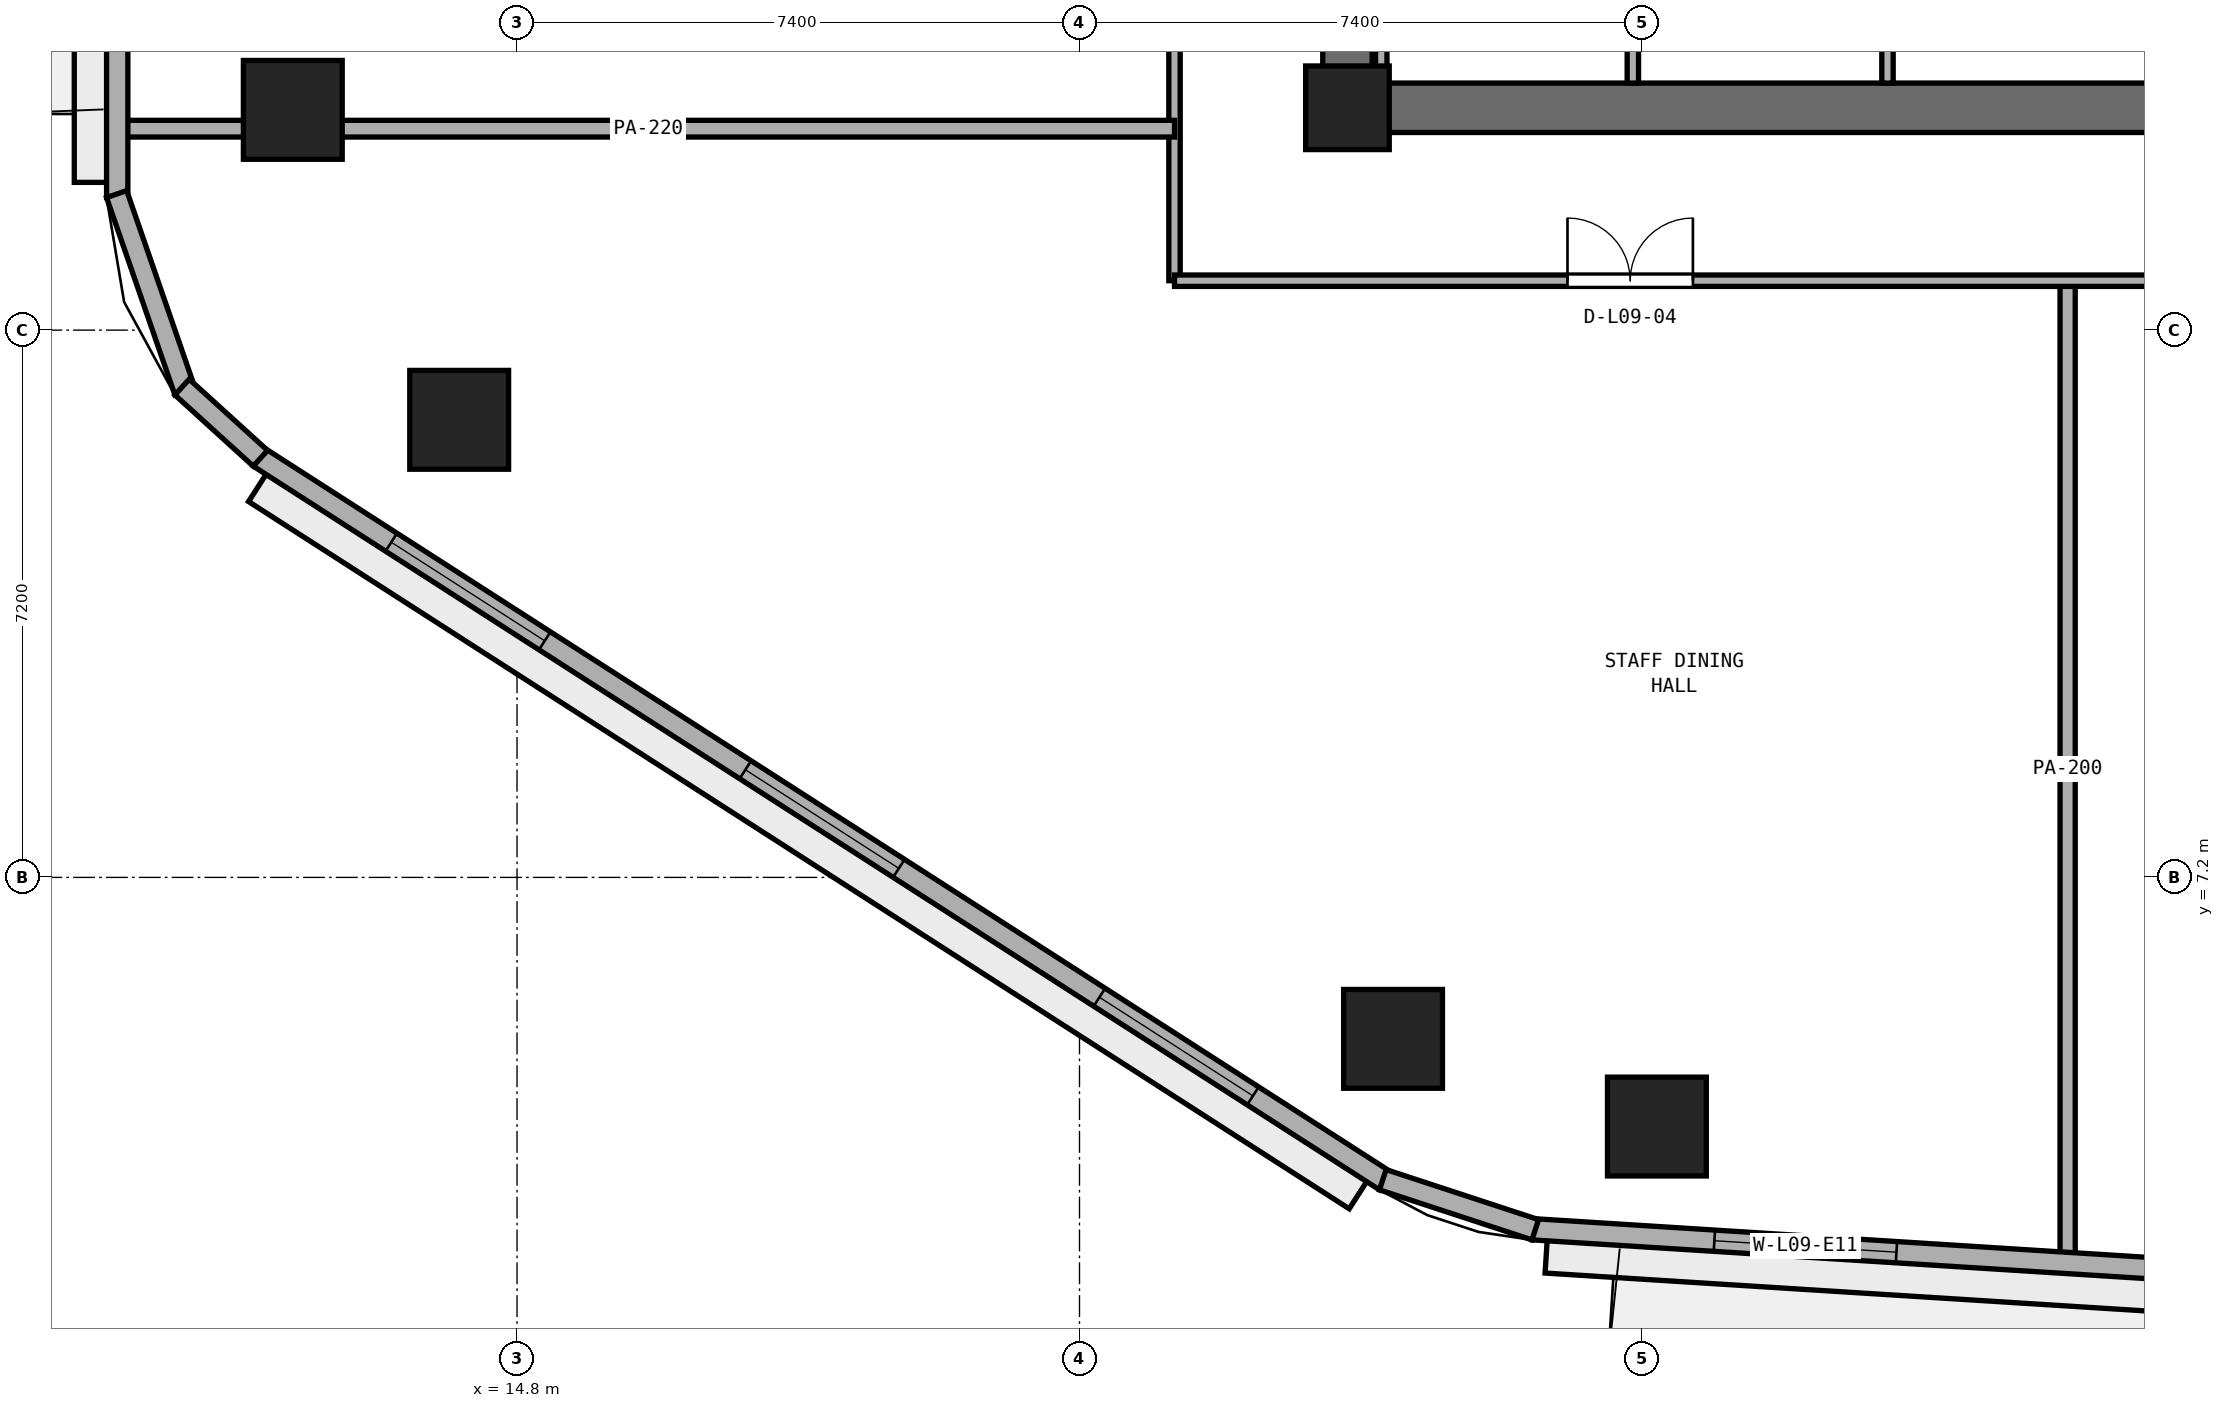
"""IFC4 building model, lengths in metres.
Left out: names, types, materials, properties, quantities, classifications, styles, units other than length and angle.
Written with IfcOpenShell. Run it as: python <this file> out.ifc"""

import sys

from ifc_helpers import new_model, si_unit, direction, frame, frame_2d, origin, origin_2d, place, context, subcontext, project, spatial, rectangle, extrude, element, fill, save


model = new_model("IFC4")
c1 = context("Model", 3, precision=1e-05, world=origin(), true_north=direction((0.0, 1.0)))
c2 = subcontext(c1, "Body", "Model", "MODEL_VIEW")
j1 = project(units=[si_unit("LENGTHUNIT", "METRE"), si_unit("PLANEANGLEUNIT", "RADIAN")], contexts=[c1])
p1 = place(None, origin())
s1 = spatial("IfcSite", under=j1, at=p1, CompositionType="ELEMENT")
p2 = place(p1, origin())
s2 = spatial("IfcBuilding", under=s1, at=p2, CompositionType="ELEMENT")
p3 = place(p2, frame((0.0, 0.0, 40.2)))
s3 = spatial("IfcBuildingStorey", under=s2, at=p3, CompositionType="ELEMENT", Elevation=40.2)
p4 = place(p3, frame((25.4, 17.325, 0.0), z_axis=(0.0, 0.0, 1.0), x_axis=(1.0, 0.0, 0.0)))
e1 = element("IfcWall", 1, at=p4, inside=s3, PredefinedType="SHEAR", context=c2, shape_type="SweptSolid", body=[
    extrude(rectangle(XDim=23.2, YDim=0.65, at=frame_2d((11.6, 0.0))), origin(), (0.0, 0.0, 1.0), 3.525),
])
p5 = place(p3, frame((25.725, 17.65, 0.0), z_axis=(0.0, 0.0, 1.0), x_axis=(0.0, 1.0, 0.0)))
e2 = element("IfcWall", 2, at=p5, inside=s3, PredefinedType="SHEAR", context=c2, shape_type="SweptSolid", body=[
    extrude(rectangle(XDim=15.1, YDim=0.65, at=frame_2d((7.55, 0.0))), origin(), (0.0, 0.0, 1.0), 3.525),
])
p6 = place(p5, frame((6.8, 0.0, 0.0)))
e3 = element("IfcOpeningElement", 3, at=p6, cuts=e2, PredefinedType="OPENING", context=c2, shape_type="SweptSolid", body=[
    extrude(rectangle(XDim=1.5, YDim=2.15, at=frame_2d((0.75, 1.075))), frame((0.0, 0.335, 0.0), z_axis=(0.0, -1.0, 0.0), x_axis=(1.0, 0.0, 0.0)), (0.0, 0.0, 1.0), 0.67),
])
p7 = place(p3, frame((25.725, 17.325, 0.0), z_axis=(0.0, 0.0, 1.0), x_axis=(1.0, 0.0, 0.0)))
e4 = element("IfcColumn", 4, at=p7, inside=s3, PredefinedType="PILASTER", context=c2, shape_type="SweptSolid", body=[
    extrude(rectangle(XDim=1.1, YDim=1.1, at=origin_2d()), origin(), (0.0, 0.0, 1.0), 3.8),
])
for number, where, z_axis, x_axis in (
    (5, (29.796, 3.922, 0.0), (0.0, 0.0, 1.0), (1.0, 0.0, 0.0)),
    (6, (11.85, 17.298, 0.0), (0.0, 0.0, 1.0), (1.0, 0.0, 0.0)),
    (7, (14.039, 13.22, 0.0), (0.0, 0.0, 1.0), (1.0, 0.0, 0.0)),
    (8, (26.325, 5.076, 0.0), (0.0, 0.0, 1.0), (1.0, 0.0, 0.0)),
):
    element("IfcColumn", number, at=place(p3, frame(where, z_axis=z_axis, x_axis=x_axis)), inside=s3, PredefinedType="COLUMN", context=c2, shape_type="SweptSolid", body=[
        extrude(rectangle(XDim=1.3, YDim=1.3, at=origin_2d()), origin(), (0.0, 0.0, 1.0), 3.8),
    ])
for number, where, z_axis, x_axis in (
    (9, (26.17, 17.65, 0.0), (0.0, 0.0, 1.0), (0.0, 1.0, 0.0)),
    (10, (29.48, 17.65, 0.0), (0.0, 0.0, 1.0), (0.0, 1.0, 0.0)),
    (11, (32.83, 17.65, 0.0), (0.0, 0.0, 1.0), (0.0, 1.0, 0.0)),
):
    element("IfcWall", number, at=place(p3, frame(where, z_axis=z_axis, x_axis=x_axis)), inside=s3, PredefinedType="PARTITIONING", context=c2, shape_type="SweptSolid", body=[
        extrude(rectangle(XDim=2.1, YDim=0.15, at=frame_2d((1.05, 0.0))), origin(), (0.0, 0.0, 1.0), 3.525),
    ])
p8 = place(p3, frame((35.2, 2.192, 0.0), z_axis=(0.0, 0.0, 1.0), x_axis=(0.0, 1.0, 0.0)))
e12 = element("IfcWall", 12, at=p8, inside=s3, PredefinedType="PARTITIONING", context=c2, shape_type="SweptSolid", body=[
    extrude(rectangle(XDim=12.858, YDim=0.2, at=frame_2d((6.429, 0.0))), origin(), (0.0, 0.0, 1.0), 3.525),
])
p9 = place(p3, frame((23.45, 15.05, 0.0), z_axis=(0.0, 0.0, 1.0), x_axis=(0.0, 1.0, 0.0)))
e13 = element("IfcWall", 13, at=p9, inside=s3, PredefinedType="PARTITIONING", context=c2, shape_type="SweptSolid", body=[
    extrude(rectangle(XDim=20.3, YDim=0.15, at=frame_2d((10.15, 0.0))), origin(), (0.0, 0.0, 1.0), 3.525),
])
p10 = place(p9, frame((8.025, 0.0, 0.0)))
e14 = element("IfcOpeningElement", 14, at=p10, cuts=e13, PredefinedType="OPENING", context=c2, shape_type="SweptSolid", body=[
    extrude(rectangle(XDim=0.9, YDim=2.1, at=frame_2d((0.45, 1.05))), frame((0.0, 0.085, 0.0), z_axis=(0.0, -1.0, 0.0), x_axis=(1.0, 0.0, 0.0)), (0.0, 0.0, 1.0), 0.17),
])
p11 = place(p9, frame((16.175, 0.0, 0.0)))
e15 = element("IfcOpeningElement", 15, at=p11, cuts=e13, PredefinedType="OPENING", context=c2, shape_type="SweptSolid", body=[
    extrude(rectangle(XDim=0.9, YDim=2.1, at=frame_2d((0.45, 1.05))), frame((0.0, 0.085, 0.0), z_axis=(0.0, -1.0, 0.0), x_axis=(1.0, 0.0, 0.0)), (0.0, 0.0, 1.0), 0.17),
])
p12 = place(p3, frame((23.45, 15.05, 0.0), z_axis=(0.0, 0.0, 1.0), x_axis=(1.0, 0.0, 0.0)))
e16 = element("IfcWall", 16, at=p12, inside=s3, PredefinedType="PARTITIONING", context=c2, shape_type="SweptSolid", body=[
    extrude(rectangle(XDim=27.1, YDim=0.15, at=frame_2d((13.55, 0.0))), origin(), (0.0, 0.0, 1.0), 3.525),
])
p13 = place(p12, frame((5.17, 0.0, 0.0)))
e17 = element("IfcOpeningElement", 17, at=p13, cuts=e16, PredefinedType="OPENING", context=c2, shape_type="SweptSolid", body=[
    extrude(rectangle(XDim=1.65, YDim=2.15, at=frame_2d((0.825, 1.075))), frame((0.0, 0.085, 0.0), z_axis=(0.0, -1.0, 0.0), x_axis=(1.0, 0.0, 0.0)), (0.0, 0.0, 1.0), 0.17),
])
p14 = place(p12, frame((18.855, 0.0, 0.0)))
e18 = element("IfcOpeningElement", 18, at=p14, cuts=e16, PredefinedType="OPENING", context=c2, shape_type="SweptSolid", body=[
    extrude(rectangle(XDim=0.9, YDim=2.1, at=frame_2d((0.45, 1.05))), frame((0.0, 0.085, 0.0), z_axis=(0.0, -1.0, 0.0), x_axis=(1.0, 0.0, 0.0)), (0.0, 0.0, 1.0), 0.17),
])
p15 = place(p3, frame((9.605, 17.05, 0.0), z_axis=(0.0, 0.0, 1.0), x_axis=(1.0, 0.0, 0.0)))
e19 = element("IfcWall", 19, at=p15, inside=s3, PredefinedType="PARTITIONING", context=c2, shape_type="SweptSolid", body=[
    extrude(rectangle(XDim=13.845, YDim=0.22, at=frame_2d((6.922, 0.0))), origin(), (0.0, 0.0, 1.0), 2.908),
])
p16 = place(p3, frame((28.161, 2.571, 0.0), z_axis=(0.0, 0.0, 1.0), x_axis=(0.998017288298, -0.06294038654, 0.0)))
e20 = element("IfcWall", 20, at=p16, inside=s3, PredefinedType="STANDARD", context=c2, shape_type="SweptSolid", body=[
    extrude(rectangle(XDim=19.577, YDim=0.28, at=frame_2d((9.789, 0.0))), origin(), (0.0, 0.0, 1.0), 3.525),
])
p17 = place(p16, frame((9.239, 0.0, 0.0)))
e21 = element("IfcOpeningElement", 21, at=p17, cuts=e20, PredefinedType="OPENING", context=c2, shape_type="SweptSolid", body=[
    extrude(rectangle(XDim=1.1, YDim=2.2, at=frame_2d((0.55, 1.1))), frame((0.0, 0.15, 0.0), z_axis=(0.0, -1.0, 0.0), x_axis=(1.0, 0.0, 0.0)), (0.0, 0.0, 1.0), 0.3),
])
p18 = place(p16, frame((2.396, 0.0, 0.9)))
e22 = element("IfcOpeningElement", 22, at=p18, cuts=e20, PredefinedType="OPENING", context=c2, shape_type="SweptSolid", body=[
    extrude(rectangle(XDim=2.4, YDim=1.75, at=frame_2d((1.2, 0.875))), frame((0.0, 0.15, 0.0), z_axis=(0.0, -1.0, 0.0), x_axis=(1.0, 0.0, 0.0)), (0.0, 0.0, 1.0), 0.3),
])
p19 = place(p16, frame((14.781, 0.0, 0.9)))
e23 = element("IfcOpeningElement", 23, at=p19, cuts=e20, PredefinedType="OPENING", context=c2, shape_type="SweptSolid", body=[
    extrude(rectangle(XDim=2.4, YDim=1.75, at=frame_2d((1.2, 0.875))), frame((0.0, 0.15, 0.0), z_axis=(0.0, -1.0, 0.0), x_axis=(1.0, 0.0, 0.0)), (0.0, 0.0, 1.0), 0.3),
])
p20 = place(p3, frame((9.54, 33.444, 0.0), z_axis=(0.0, 0.0, 1.0), x_axis=(0.0, -1.0, 0.0)))
e24 = element("IfcWall", 24, at=p20, inside=s3, PredefinedType="STANDARD", context=c2, shape_type="SweptSolid", body=[
    extrude(rectangle(XDim=17.301, YDim=0.28, at=frame_2d((8.65, 0.0))), origin(), (0.0, 0.0, 1.0), 3.525),
])
p21 = place(p20, frame((8.1, 0.0, 0.0)))
e25 = element("IfcOpeningElement", 25, at=p21, cuts=e24, PredefinedType="OPENING", context=c2, shape_type="SweptSolid", body=[
    extrude(rectangle(XDim=1.1, YDim=2.2, at=frame_2d((0.55, 1.1))), frame((0.0, 0.15, 0.0), z_axis=(0.0, -1.0, 0.0), x_axis=(1.0, 0.0, 0.0)), (0.0, 0.0, 1.0), 0.3),
])
p22 = place(p20, frame((12.884, 0.0, 0.9)))
e26 = element("IfcOpeningElement", 26, at=p22, cuts=e24, PredefinedType="OPENING", context=c2, shape_type="SweptSolid", body=[
    extrude(rectangle(XDim=2.4, YDim=1.75, at=frame_2d((1.2, 0.875))), frame((0.0, 0.15, 0.0), z_axis=(0.0, -1.0, 0.0), x_axis=(1.0, 0.0, 0.0)), (0.0, 0.0, 1.0), 0.3),
])
p23 = place(p3, frame((11.405, 12.728, 0.0), z_axis=(0.0, 0.0, 1.0), x_axis=(0.841304564637, -0.540561402175, 0.0)))
e27 = element("IfcWall", 27, at=p23, inside=s3, PredefinedType="STANDARD", context=c2, shape_type="SweptSolid", body=[
    extrude(rectangle(XDim=17.612, YDim=0.28, at=frame_2d((8.806, 0.0))), origin(), (0.0, 0.0, 1.0), 3.525),
])
p24 = place(p23, frame((2.069, 0.0, 0.9)))
e28 = element("IfcOpeningElement", 28, at=p24, cuts=e27, PredefinedType="OPENING", context=c2, shape_type="SweptSolid", body=[
    extrude(rectangle(XDim=2.4, YDim=1.75, at=frame_2d((1.2, 0.875))), frame((0.0, 0.15, 0.0), z_axis=(0.0, -1.0, 0.0), x_axis=(1.0, 0.0, 0.0)), (0.0, 0.0, 1.0), 0.3),
])
p25 = place(p23, frame((7.606, 0.0, 0.9)))
e29 = element("IfcOpeningElement", 29, at=p25, cuts=e27, PredefinedType="OPENING", context=c2, shape_type="SweptSolid", body=[
    extrude(rectangle(XDim=2.4, YDim=1.75, at=frame_2d((1.2, 0.875))), frame((0.0, 0.15, 0.0), z_axis=(0.0, -1.0, 0.0), x_axis=(1.0, 0.0, 0.0)), (0.0, 0.0, 1.0), 0.3),
])
p26 = place(p23, frame((13.143, 0.0, 0.9)))
e30 = element("IfcOpeningElement", 30, at=p26, cuts=e27, PredefinedType="OPENING", context=c2, shape_type="SweptSolid", body=[
    extrude(rectangle(XDim=2.4, YDim=1.75, at=frame_2d((1.2, 0.875))), frame((0.0, 0.15, 0.0), z_axis=(0.0, -1.0, 0.0), x_axis=(1.0, 0.0, 0.0)), (0.0, 0.0, 1.0), 0.3),
])
p27 = place(p3, frame((9.532, 16.189, 0.0), z_axis=(0.0, 0.0, 1.0), x_axis=(0.32708309668, -0.944995580871, 0.0)))
e31 = element("IfcWall", 31, at=p27, inside=s3, PredefinedType="STANDARD", context=c2, shape_type="SweptSolid", body=[
    extrude(rectangle(XDim=2.748, YDim=0.28, at=frame_2d((1.374, 0.0))), origin(), (0.0, 0.0, 1.0), 3.525),
])
p28 = place(p3, frame((10.393, 13.651, 0.0), z_axis=(0.0, 0.0, 1.0), x_axis=(0.74003521851, -0.672568119498, 0.0)))
e32 = element("IfcWall", 32, at=p28, inside=s3, PredefinedType="STANDARD", context=c2, shape_type="SweptSolid", body=[
    extrude(rectangle(XDim=1.393, YDim=0.28, at=frame_2d((0.697, 0.0))), origin(), (0.0, 0.0, 1.0), 3.525),
])
p29 = place(p3, frame((26.19, 3.223, 0.0), z_axis=(0.0, 0.0, 1.0), x_axis=(0.95016442175, -0.311749212734, 0.0)))
e33 = element("IfcWall", 33, at=p29, inside=s3, PredefinedType="STANDARD", context=c2, shape_type="SweptSolid", body=[
    extrude(rectangle(XDim=2.111, YDim=0.28, at=frame_2d((1.056, 0.0))), origin(), (0.0, 0.0, 1.0), 3.525),
])
p30 = place(p13, origin())
e34 = element("IfcDoor", 34, at=p30, inside=s3, OperationType="DOUBLE_DOOR_SINGLE_SWING", PredefinedType="DOOR", context=c2, shape_type="SweptSolid", body=[
    extrude(rectangle(XDim=1.65, YDim=2.15, at=frame_2d((0.825, 1.075))), frame((0.0, 0.025, 0.0), z_axis=(0.0, -1.0, 0.0), x_axis=(1.0, 0.0, 0.0)), (0.0, 0.0, 1.0), 0.05),
])
fill(e17, e34)
p31 = place(p18, origin())
e35 = element("IfcWindow", 35, at=p31, inside=s3, PartitioningType="SINGLE_PANEL", PredefinedType="WINDOW", context=c2, shape_type="SweptSolid", body=[
    extrude(rectangle(XDim=2.4, YDim=1.75, at=frame_2d((1.2, 0.875))), frame((0.0, 0.03, 0.0), z_axis=(0.0, -1.0, 0.0), x_axis=(1.0, 0.0, 0.0)), (0.0, 0.0, 1.0), 0.06),
])
fill(e22, e35)
p32 = place(p24, origin())
e36 = element("IfcWindow", 36, at=p32, inside=s3, PartitioningType="SINGLE_PANEL", PredefinedType="WINDOW", context=c2, shape_type="SweptSolid", body=[
    extrude(rectangle(XDim=2.4, YDim=1.75, at=frame_2d((1.2, 0.875))), frame((0.0, 0.03, 0.0), z_axis=(0.0, -1.0, 0.0), x_axis=(1.0, 0.0, 0.0)), (0.0, 0.0, 1.0), 0.06),
])
fill(e28, e36)
p33 = place(p25, origin())
e37 = element("IfcWindow", 37, at=p33, inside=s3, PartitioningType="SINGLE_PANEL", PredefinedType="WINDOW", context=c2, shape_type="SweptSolid", body=[
    extrude(rectangle(XDim=2.4, YDim=1.75, at=frame_2d((1.2, 0.875))), frame((0.0, 0.03, 0.0), z_axis=(0.0, -1.0, 0.0), x_axis=(1.0, 0.0, 0.0)), (0.0, 0.0, 1.0), 0.06),
])
fill(e29, e37)
p34 = place(p26, origin())
e38 = element("IfcWindow", 38, at=p34, inside=s3, PartitioningType="SINGLE_PANEL", PredefinedType="WINDOW", context=c2, shape_type="SweptSolid", body=[
    extrude(rectangle(XDim=2.4, YDim=1.75, at=frame_2d((1.2, 0.875))), frame((0.0, 0.03, 0.0), z_axis=(0.0, -1.0, 0.0), x_axis=(1.0, 0.0, 0.0)), (0.0, 0.0, 1.0), 0.06),
])
fill(e30, e38)
save(model, sys.argv[1])
